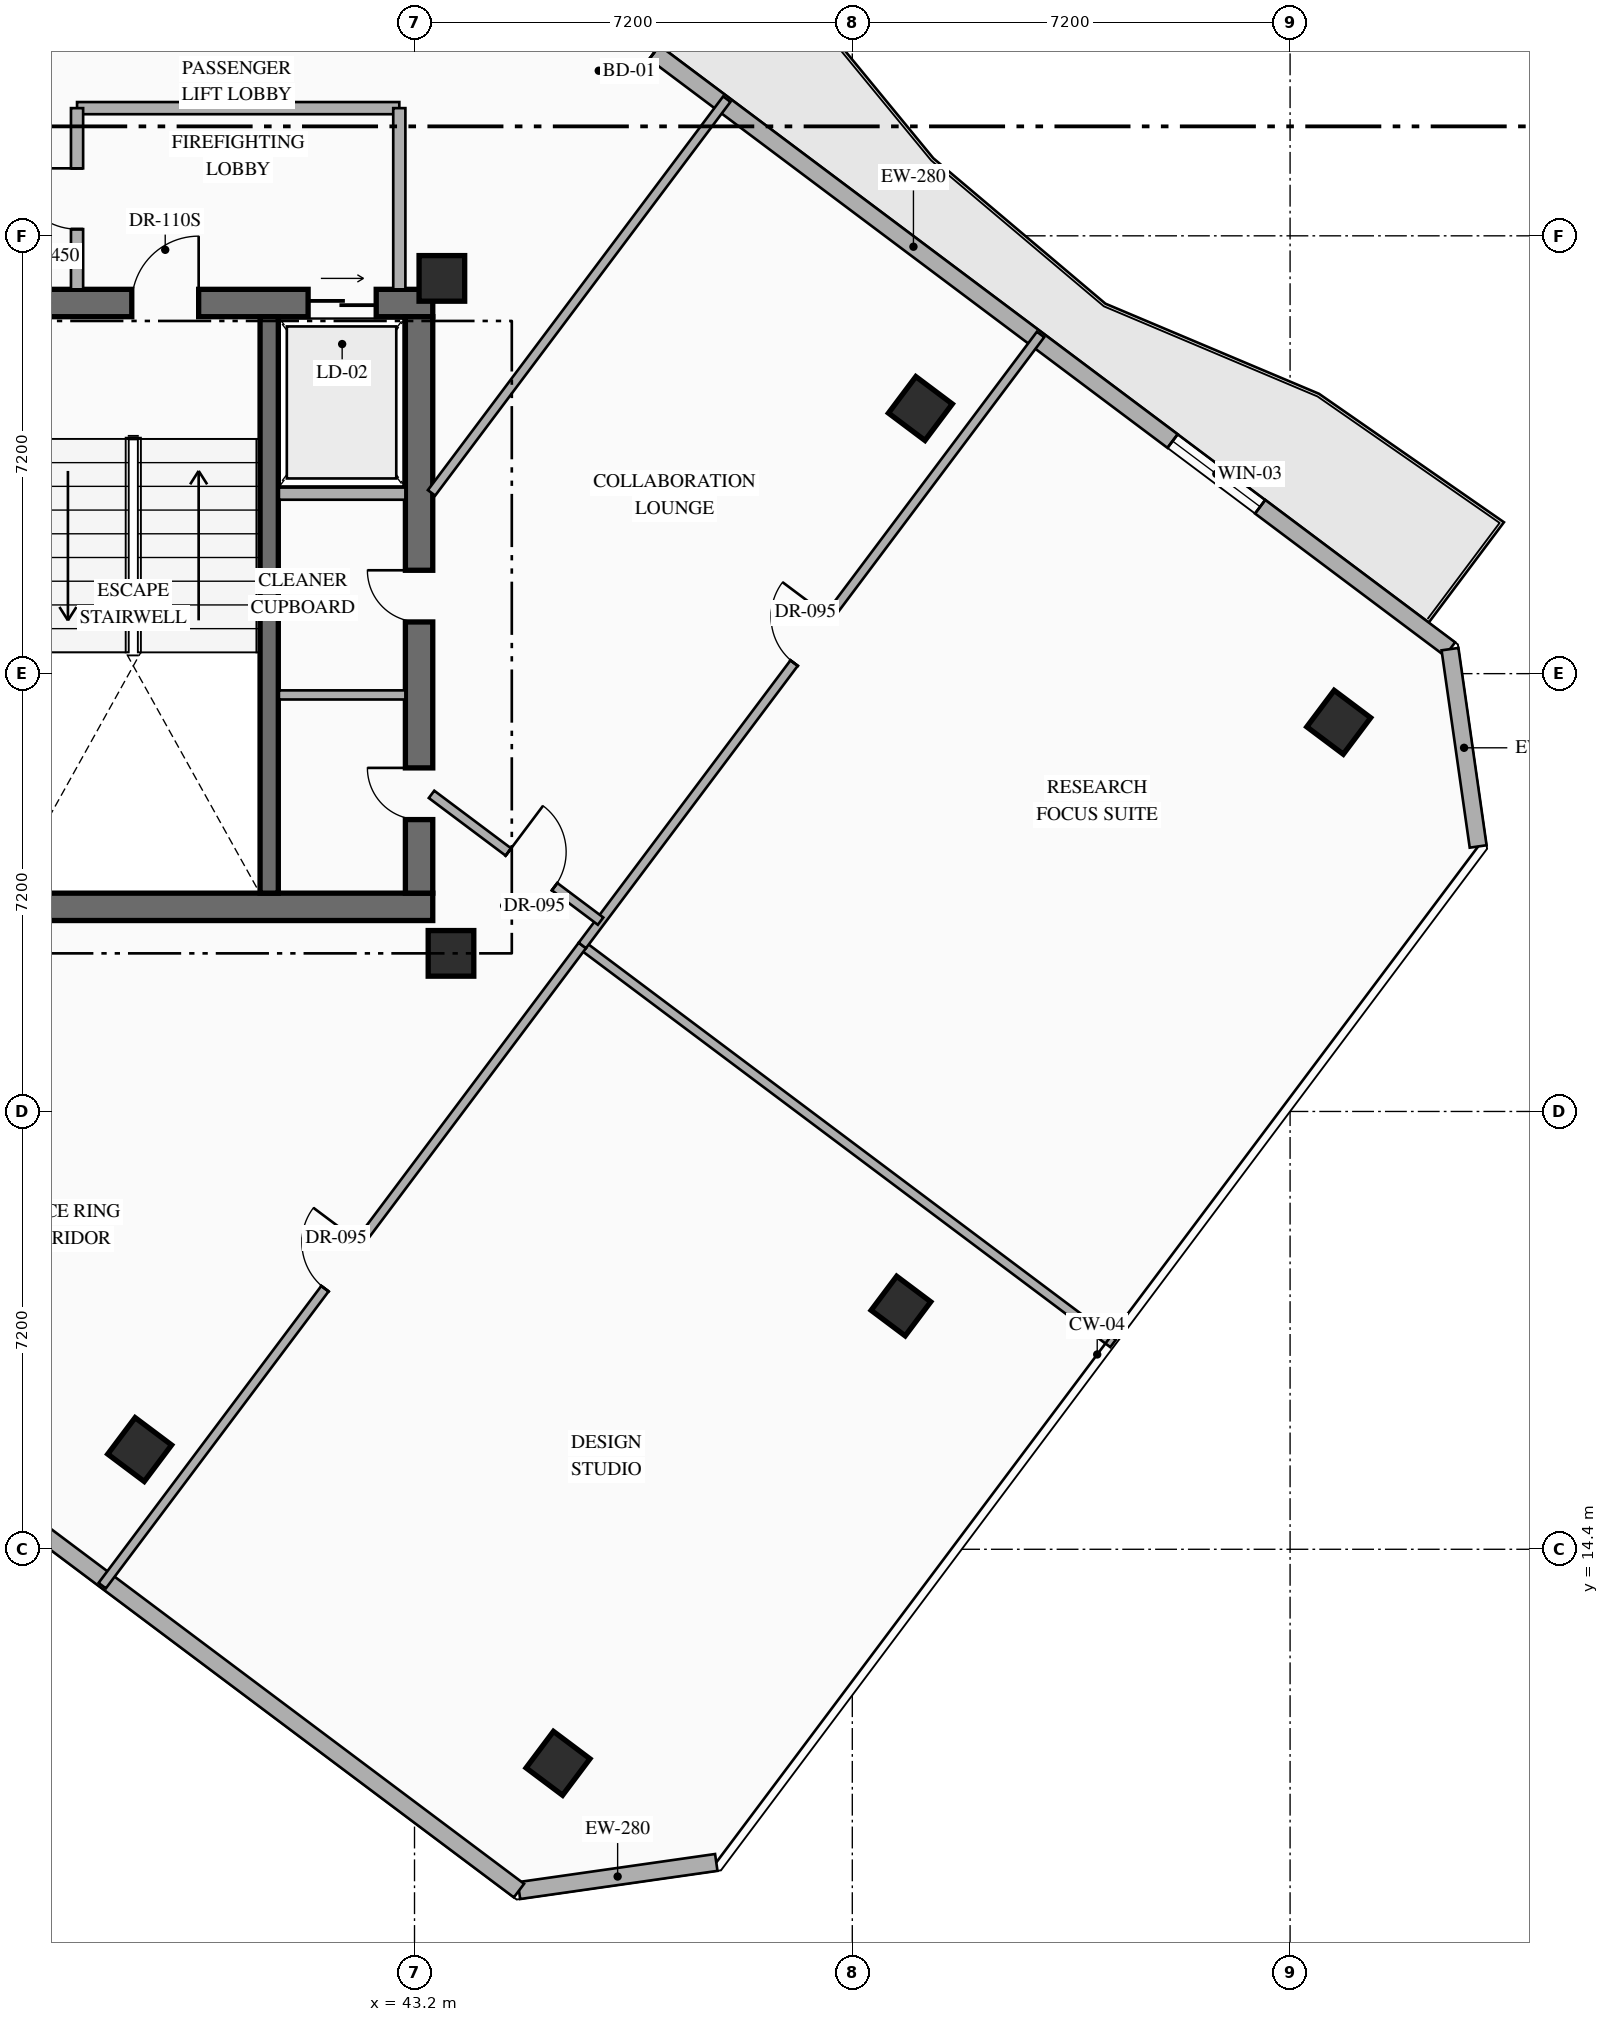
"""IFC4 building model, lengths in metres.
Left out: names, types, materials, properties, quantities, classifications, styles, units other than length and angle.
Written with IfcOpenShell. Run it as: python <this file> out.ifc"""

import sys

from ifc_helpers import new_model, si_unit, direction, frame, frame_2d, origin, origin_2d, place, context, subcontext, project, spatial, rectangle, hollow_rectangle, extrude, element, fill, save


model = new_model("IFC4")
c1 = context("Model", 3, precision=1e-05, world=origin(), true_north=direction((0.0, 1.0)))
c2 = subcontext(c1, "Body", "Model", "MODEL_VIEW")
j1 = project(units=[si_unit("LENGTHUNIT", "METRE"), si_unit("PLANEANGLEUNIT", "RADIAN")], contexts=[c1])
p1 = place(None, origin())
s1 = spatial("IfcSite", under=j1, at=p1, CompositionType="ELEMENT")
p2 = place(p1, origin())
s2 = spatial("IfcBuilding", under=s1, at=p2, CompositionType="ELEMENT")
p3 = place(p2, frame((0.0, 0.0, 202.35)))
s3 = spatial("IfcBuildingStorey", under=s2, at=p3, CompositionType="ELEMENT", Elevation=202.35)
p4 = place(p3, frame((36.04, 24.965, 0.0), z_axis=(0.0, 0.0, 1.0), x_axis=(1.0, 0.0, 0.0)))
e1 = element("IfcWall", 1, at=p4, inside=s3, PredefinedType="SHEAR", context=c2, shape_type="SweptSolid", body=[
    extrude(rectangle(XDim=7.46, YDim=0.45, at=frame_2d((3.73, 0.0))), origin(), (0.0, 0.0, 1.0), 3.6),
])
p5 = place(p3, frame((36.04, 34.895, 0.0), z_axis=(0.0, 0.0, 1.0), x_axis=(1.0, 0.0, 0.0)))
e2 = element("IfcWall", 2, at=p5, inside=s3, PredefinedType="SHEAR", context=c2, shape_type="SweptSolid", body=[
    extrude(rectangle(XDim=7.46, YDim=0.45, at=frame_2d((3.73, 0.0))), origin(), (0.0, 0.0, 1.0), 3.6),
])
p6 = place(p5, frame((2.51, 0.0, 0.0)))
e3 = element("IfcOpeningElement", 3, at=p6, cuts=e2, PredefinedType="OPENING", context=c2, shape_type="SweptSolid", body=[
    extrude(rectangle(XDim=1.1, YDim=2.2, at=frame_2d((0.55, 1.1))), frame((0.0, 0.235, 0.0), z_axis=(0.0, -1.0, 0.0), x_axis=(1.0, 0.0, 0.0)), (0.0, 0.0, 1.0), 0.47),
])
p7 = place(p5, frame((5.41, 0.0, 0.0)))
e4 = element("IfcOpeningElement", 4, at=p7, cuts=e2, PredefinedType="OPENING", context=c2, shape_type="SweptSolid", body=[
    extrude(rectangle(XDim=1.12, YDim=2.15, at=frame_2d((0.56, 1.075))), frame((0.0, 0.235, 0.0), z_axis=(0.0, -1.0, 0.0), x_axis=(1.0, 0.0, 0.0)), (0.0, 0.0, 1.0), 0.47),
])
p8 = place(p3, frame((43.275, 25.19, 0.0), z_axis=(0.0, 0.0, 1.0), x_axis=(0.0, 1.0, 0.0)))
e5 = element("IfcWall", 5, at=p8, inside=s3, PredefinedType="SHEAR", context=c2, shape_type="SweptSolid", body=[
    extrude(rectangle(XDim=9.48, YDim=0.45, at=frame_2d((4.74, 0.0))), origin(), (0.0, 0.0, 1.0), 3.6),
])
p9 = place(p8, frame((1.21, 0.0, 0.0)))
e6 = element("IfcOpeningElement", 6, at=p9, cuts=e5, PredefinedType="OPENING", context=c2, shape_type="SweptSolid", body=[
    extrude(rectangle(XDim=0.85, YDim=2.08, at=frame_2d((0.425, 1.04))), frame((0.0, 0.235, 0.0), z_axis=(0.0, -1.0, 0.0), x_axis=(1.0, 0.0, 0.0)), (0.0, 0.0, 1.0), 0.47),
])
p10 = place(p8, frame((4.46, 0.0, 0.0)))
e7 = element("IfcOpeningElement", 7, at=p10, cuts=e5, PredefinedType="OPENING", context=c2, shape_type="SweptSolid", body=[
    extrude(rectangle(XDim=0.85, YDim=2.08, at=frame_2d((0.425, 1.04))), frame((0.0, 0.235, 0.0), z_axis=(0.0, -1.0, 0.0), x_axis=(1.0, 0.0, 0.0)), (0.0, 0.0, 1.0), 0.47),
])
p11 = place(p3, frame((40.81, 25.19, 0.0), z_axis=(0.0, 0.0, 1.0), x_axis=(0.0, 1.0, 0.0)))
e8 = element("IfcWall", 8, at=p11, inside=s3, PredefinedType="SHEAR", context=c2, shape_type="SweptSolid", body=[
    extrude(rectangle(XDim=9.48, YDim=0.3, at=frame_2d((4.74, 0.0))), origin(), (0.0, 0.0, 1.0), 3.6),
])
for number, where, z_axis, x_axis in (
    (9, (43.8, 24.2, 0.0), (0.0, 0.0, 1.0), (1.0, 0.0, 0.0)),
    (10, (43.65, 35.3, 0.0), (0.0, 0.0, 1.0), (1.0, 0.0, 0.0)),
    (11, (38.68, 16.04, 0.0), (0.0, 0.0, 1.0), (0.8, -0.6, 0.0)),
    (12, (51.52, 33.16, 0.0), (0.0, 0.0, 1.0), (0.8, -0.6, 0.0)),
    (13, (45.56, 10.88, 0.0), (0.0, 0.0, 1.0), (0.8, -0.6, 0.0)),
    (14, (58.4, 28.0, 0.0), (0.0, 0.0, 1.0), (0.8, -0.6, 0.0)),
):
    element("IfcColumn", number, at=place(p3, frame(where, z_axis=z_axis, x_axis=x_axis)), inside=s3, PredefinedType="COLUMN", context=c2, shape_type="SweptSolid", body=[
        extrude(hollow_rectangle(XDim=0.75, YDim=0.75, WallThickness=0.028, at=origin_2d()), origin(), (0.0, 0.0, 1.0), 3.6),
    ])
p12 = place(p3, frame((51.2, 18.4, 0.0), z_axis=(0.0, 0.0, 1.0), x_axis=(0.799999996291, -0.600000004945, 0.0)))
e15 = element("IfcColumn", 15, at=p12, inside=s3, PredefinedType="COLUMN", context=c2, shape_type="SweptSolid", body=[
    extrude(hollow_rectangle(XDim=0.7, YDim=0.7, WallThickness=0.028, at=origin_2d()), origin(), (0.0, 0.0, 1.0), 3.6),
])
p13 = place(p3, frame((44.86, 40.73, 0.0), z_axis=(0.0, 0.0, 1.0), x_axis=(0.800007624502, -0.599989833863, 0.0)))
e16 = element("IfcWall", 16, at=p13, inside=s3, PredefinedType="STANDARD", context=c2, shape_type="SweptSolid", body=[
    extrude(rectangle(XDim=19.212, YDim=0.28, at=frame_2d((9.606, 0.0))), origin(), (0.0, 0.0, 1.0), 3.35),
])
p14 = place(p13, frame((1.755, 0.0, 0.0)))
e17 = element("IfcOpeningElement", 17, at=p14, cuts=e16, PredefinedType="OPENING", context=c2, shape_type="SweptSolid", body=[
    extrude(rectangle(XDim=1.1, YDim=2.2, at=frame_2d((0.55, 1.1))), frame((0.0, 0.15, 0.0), z_axis=(0.0, -1.0, 0.0), x_axis=(1.0, 0.0, 0.0)), (0.0, 0.0, 1.0), 0.3),
])
p15 = place(p13, frame((13.509, 0.0, 0.85)))
e18 = element("IfcOpeningElement", 18, at=p15, cuts=e16, PredefinedType="OPENING", context=c2, shape_type="SweptSolid", body=[
    extrude(rectangle(XDim=1.8, YDim=2.1, at=frame_2d((0.9, 1.05))), frame((0.0, 0.15, 0.0), z_axis=(0.0, -1.0, 0.0), x_axis=(1.0, 0.0, 0.0)), (0.0, 0.0, 1.0), 0.3),
])
p16 = place(p3, frame((60.23, 29.203, 0.0), z_axis=(0.0, 0.0, 1.0), x_axis=(0.141296221922, -0.989967361922, 0.0)))
e19 = element("IfcWall", 19, at=p16, inside=s3, PredefinedType="STANDARD", context=c2, shape_type="SweptSolid", body=[
    extrude(rectangle(XDim=3.278, YDim=0.28, at=frame_2d((1.639, 0.0))), origin(), (0.0, 0.0, 1.0), 3.35),
])
p17 = place(p3, frame((48.163, 9.25, 0.0), z_axis=(0.0, 0.0, 1.0), x_axis=(-0.989979263428, -0.141212810973, 0.0)))
e20 = element("IfcWall", 20, at=p17, inside=s3, PredefinedType="STANDARD", context=c2, shape_type="SweptSolid", body=[
    extrude(rectangle(XDim=3.278, YDim=0.28, at=frame_2d((1.639, 0.0))), origin(), (0.0, 0.0, 1.0), 3.35),
])
p18 = place(p3, frame((44.918, 8.787, 0.0), z_axis=(0.0, 0.0, 1.0), x_axis=(-0.800004765927, 0.599993645378, 0.0)))
e21 = element("IfcWall", 21, at=p18, inside=s3, PredefinedType="STANDARD", context=c2, shape_type="SweptSolid", body=[
    extrude(rectangle(XDim=24.588, YDim=0.28, at=frame_2d((12.294, 0.0))), origin(), (0.0, 0.0, 1.0), 3.35),
])
p19 = place(p3, frame((40.97, 31.76, 0.0), z_axis=(0.0, 0.0, 1.0), x_axis=(1.0, 0.0, 0.0)))
e22 = element("IfcWall", 22, at=p19, inside=s3, PredefinedType="STANDARD", context=c2, shape_type="SweptSolid", body=[
    extrude(rectangle(XDim=2.08, YDim=0.2, at=frame_2d((1.04, 0.0))), origin(), (0.0, 0.0, 1.0), 3.35),
])
p20 = place(p3, frame((40.97, 28.45, 0.0), z_axis=(0.0, 0.0, 1.0), x_axis=(1.0, 0.0, 0.0)))
e23 = element("IfcWall", 23, at=p20, inside=s3, PredefinedType="PARTITIONING", context=c2, shape_type="SweptSolid", body=[
    extrude(rectangle(XDim=2.08, YDim=0.15, at=frame_2d((1.04, 0.0))), origin(), (0.0, 0.0, 1.0), 3.35),
])
p21 = place(p3, frame((37.65, 38.1, 0.0), z_axis=(0.0, 0.0, 1.0), x_axis=(1.0, 0.0, 0.0)))
e24 = element("IfcWall", 24, at=p21, inside=s3, PredefinedType="STANDARD", context=c2, shape_type="SweptSolid", body=[
    extrude(rectangle(XDim=5.3, YDim=0.2, at=frame_2d((2.65, 0.0))), origin(), (0.0, 0.0, 1.0), 3.35),
])
p22 = place(p3, frame((42.95, 35.12, 0.0), z_axis=(0.0, 0.0, 1.0), x_axis=(0.0, 1.0, 0.0)))
e25 = element("IfcWall", 25, at=p22, inside=s3, PredefinedType="STANDARD", context=c2, shape_type="SweptSolid", body=[
    extrude(rectangle(XDim=2.98, YDim=0.2, at=frame_2d((1.49, 0.0))), origin(), (0.0, 0.0, 1.0), 3.35),
])
p23 = place(p3, frame((37.65, 35.12, 0.0), z_axis=(0.0, 0.0, 1.0), x_axis=(0.0, 1.0, 0.0)))
e26 = element("IfcWall", 26, at=p23, inside=s3, PredefinedType="STANDARD", context=c2, shape_type="SweptSolid", body=[
    extrude(rectangle(XDim=2.98, YDim=0.2, at=frame_2d((1.49, 0.0))), origin(), (0.0, 0.0, 1.0), 3.35),
])
p24 = place(p23, frame((0.99, 0.0, 0.0)))
e27 = element("IfcOpeningElement", 27, at=p24, cuts=e26, PredefinedType="OPENING", context=c2, shape_type="SweptSolid", body=[
    extrude(rectangle(XDim=1.0, YDim=2.2, at=frame_2d((0.5, 1.1))), frame((0.0, 0.11, 0.0), z_axis=(0.0, -1.0, 0.0), x_axis=(1.0, 0.0, 0.0)), (0.0, 0.0, 1.0), 0.22),
])
p25 = place(p3, frame((45.96, 24.33, 0.0), z_axis=(0.0, 0.0, 1.0), x_axis=(0.799994629375, -0.600007160767, 0.0)))
e28 = element("IfcWall", 28, at=p25, inside=s3, PredefinedType="PARTITIONING", context=c2, shape_type="SweptSolid", body=[
    extrude(rectangle(XDim=10.91, YDim=0.15, at=frame_2d((5.455, 0.0))), origin(), (0.0, 0.0, 1.0), 3.35),
])
p26 = place(p3, frame((38.064, 13.802, 0.0), z_axis=(0.0, 0.0, 1.0), x_axis=(0.599997031734, 0.800002226191, 0.0)))
e29 = element("IfcWall", 29, at=p26, inside=s3, PredefinedType="PARTITIONING", context=c2, shape_type="SweptSolid", body=[
    extrude(rectangle(XDim=13.16, YDim=0.15, at=frame_2d((6.58, 0.0))), origin(), (0.0, 0.0, 1.0), 3.35),
])
p27 = place(p26, frame((6.105, 0.0, 0.0)))
e30 = element("IfcOpeningElement", 30, at=p27, cuts=e29, PredefinedType="OPENING", context=c2, shape_type="SweptSolid", body=[
    extrude(rectangle(XDim=0.95, YDim=2.15, at=frame_2d((0.475, 1.075))), frame((0.0, 0.085, 0.0), z_axis=(0.0, -1.0, 0.0), x_axis=(1.0, 0.0, 0.0)), (0.0, 0.0, 1.0), 0.17),
])
p28 = place(p3, frame((45.96, 24.33, 0.0), z_axis=(0.0, 0.0, 1.0), x_axis=(0.600012440253, 0.799990669659, 0.0)))
e31 = element("IfcWall", 31, at=p28, inside=s3, PredefinedType="PARTITIONING", context=c2, shape_type="SweptSolid", body=[
    extrude(rectangle(XDim=12.56, YDim=0.15, at=frame_2d((6.28, 0.0))), origin(), (0.0, 0.0, 1.0), 3.35),
])
p29 = place(p28, frame((5.805, 0.0, 0.0)))
e32 = element("IfcOpeningElement", 32, at=p29, cuts=e31, PredefinedType="OPENING", context=c2, shape_type="SweptSolid", body=[
    extrude(rectangle(XDim=0.95, YDim=2.15, at=frame_2d((0.475, 1.075))), frame((0.0, 0.085, 0.0), z_axis=(0.0, -1.0, 0.0), x_axis=(1.0, 0.0, 0.0)), (0.0, 0.0, 1.0), 0.17),
])
p30 = place(p3, frame((43.48, 26.815, 0.0), z_axis=(0.0, 0.0, 1.0), x_axis=(0.800008430676, -0.599988758934, 0.0)))
e33 = element("IfcWall", 33, at=p30, inside=s3, PredefinedType="PARTITIONING", context=c2, shape_type="SweptSolid", body=[
    extrude(rectangle(XDim=3.475, YDim=0.15, at=frame_2d((1.738, 0.0))), origin(), (0.0, 0.0, 1.0), 3.35),
])
p31 = place(p30, frame((1.58, 0.0, 0.0)))
e34 = element("IfcOpeningElement", 34, at=p31, cuts=e33, PredefinedType="OPENING", context=c2, shape_type="SweptSolid", body=[
    extrude(rectangle(XDim=0.95, YDim=2.15, at=frame_2d((0.475, 1.075))), frame((0.0, 0.085, 0.0), z_axis=(0.0, -1.0, 0.0), x_axis=(1.0, 0.0, 0.0)), (0.0, 0.0, 1.0), 0.17),
])
p32 = place(p3, frame((43.48, 31.773, 0.0), z_axis=(0.0, 0.0, 1.0), x_axis=(0.599971041729, 0.800021717885, 0.0)))
e35 = element("IfcWall", 35, at=p32, inside=s3, PredefinedType="PARTITIONING", context=c2, shape_type="SweptSolid", body=[
    extrude(rectangle(XDim=8.094, YDim=0.15, at=frame_2d((4.047, 0.0))), origin(), (0.0, 0.0, 1.0), 3.35),
])
p33 = place(p14, origin())
e36 = element("IfcDoor", 36, at=p33, inside=s3, OperationType="SINGLE_SWING_LEFT", PredefinedType="DOOR", context=c2, shape_type="SweptSolid", body=[
    extrude(rectangle(XDim=1.1, YDim=2.2, at=frame_2d((0.55, 1.1))), frame((0.0, 0.025, 0.0), z_axis=(0.0, -1.0, 0.0), x_axis=(1.0, 0.0, 0.0)), (0.0, 0.0, 1.0), 0.05),
])
fill(e17, e36)
p34 = place(p15, origin())
e37 = element("IfcWindow", 37, at=p34, inside=s3, PartitioningType="SINGLE_PANEL", PredefinedType="WINDOW", context=c2, shape_type="SweptSolid", body=[
    extrude(rectangle(XDim=1.8, YDim=2.1, at=frame_2d((0.9, 1.05))), frame((0.0, 0.03, 0.0), z_axis=(0.0, -1.0, 0.0), x_axis=(1.0, 0.0, 0.0)), (0.0, 0.0, 1.0), 0.06),
])
fill(e18, e37)
p35 = place(p6, origin())
e38 = element("IfcDoor", 38, at=p35, inside=s3, OperationType="SINGLE_SWING_RIGHT", PredefinedType="DOOR", context=c2, shape_type="SweptSolid", body=[
    extrude(rectangle(XDim=1.1, YDim=2.2, at=frame_2d((0.55, 1.1))), frame((0.0, 0.025, 0.0), z_axis=(0.0, -1.0, 0.0), x_axis=(1.0, 0.0, 0.0)), (0.0, 0.0, 1.0), 0.05),
])
fill(e3, e38)
p36 = place(p7, origin())
e39 = element("IfcDoor", 39, at=p36, inside=s3, OperationType="SLIDING_TO_RIGHT", PredefinedType="USERDEFINED", context=c2, shape_type="SweptSolid", body=[
    extrude(rectangle(XDim=1.12, YDim=2.15, at=frame_2d((0.56, 1.075))), frame((0.0, 0.025, 0.0), z_axis=(0.0, -1.0, 0.0), x_axis=(1.0, 0.0, 0.0)), (0.0, 0.0, 1.0), 0.05),
])
fill(e4, e39)
p37 = place(p9, origin())
e40 = element("IfcDoor", 40, at=p37, inside=s3, OperationType="SINGLE_SWING_RIGHT", PredefinedType="DOOR", context=c2, shape_type="SweptSolid", body=[
    extrude(rectangle(XDim=0.85, YDim=2.08, at=frame_2d((0.425, 1.04))), frame((0.0, 0.025, 0.0), z_axis=(0.0, -1.0, 0.0), x_axis=(1.0, 0.0, 0.0)), (0.0, 0.0, 1.0), 0.05),
])
fill(e6, e40)
p38 = place(p10, origin())
e41 = element("IfcDoor", 41, at=p38, inside=s3, OperationType="SINGLE_SWING_RIGHT", PredefinedType="DOOR", context=c2, shape_type="SweptSolid", body=[
    extrude(rectangle(XDim=0.85, YDim=2.08, at=frame_2d((0.425, 1.04))), frame((0.0, 0.025, 0.0), z_axis=(0.0, -1.0, 0.0), x_axis=(1.0, 0.0, 0.0)), (0.0, 0.0, 1.0), 0.05),
])
fill(e7, e41)
p39 = place(p24, origin())
e42 = element("IfcDoor", 42, at=p39, inside=s3, OperationType="SINGLE_SWING_RIGHT", PredefinedType="DOOR", context=c2, shape_type="SweptSolid", body=[
    extrude(rectangle(XDim=1.0, YDim=2.2, at=frame_2d((0.5, 1.1))), frame((0.0, 0.025, 0.0), z_axis=(0.0, -1.0, 0.0), x_axis=(1.0, 0.0, 0.0)), (0.0, 0.0, 1.0), 0.05),
])
fill(e27, e42)
p40 = place(p27, origin())
e43 = element("IfcDoor", 43, at=p40, inside=s3, OperationType="SINGLE_SWING_RIGHT", PredefinedType="DOOR", context=c2, shape_type="SweptSolid", body=[
    extrude(rectangle(XDim=0.95, YDim=2.15, at=frame_2d((0.475, 1.075))), frame((0.0, 0.025, 0.0), z_axis=(0.0, -1.0, 0.0), x_axis=(1.0, 0.0, 0.0)), (0.0, 0.0, 1.0), 0.05),
])
fill(e30, e43)
p41 = place(p29, origin())
e44 = element("IfcDoor", 44, at=p41, inside=s3, OperationType="SINGLE_SWING_RIGHT", PredefinedType="DOOR", context=c2, shape_type="SweptSolid", body=[
    extrude(rectangle(XDim=0.95, YDim=2.15, at=frame_2d((0.475, 1.075))), frame((0.0, 0.025, 0.0), z_axis=(0.0, -1.0, 0.0), x_axis=(1.0, 0.0, 0.0)), (0.0, 0.0, 1.0), 0.05),
])
fill(e32, e44)
p42 = place(p31, origin())
e45 = element("IfcDoor", 45, at=p42, inside=s3, OperationType="SINGLE_SWING_LEFT", PredefinedType="DOOR", context=c2, shape_type="SweptSolid", body=[
    extrude(rectangle(XDim=0.95, YDim=2.15, at=frame_2d((0.475, 1.075))), frame((0.0, 0.025, 0.0), z_axis=(0.0, -1.0, 0.0), x_axis=(1.0, 0.0, 0.0)), (0.0, 0.0, 1.0), 0.05),
])
fill(e34, e45)
save(model, sys.argv[1])
